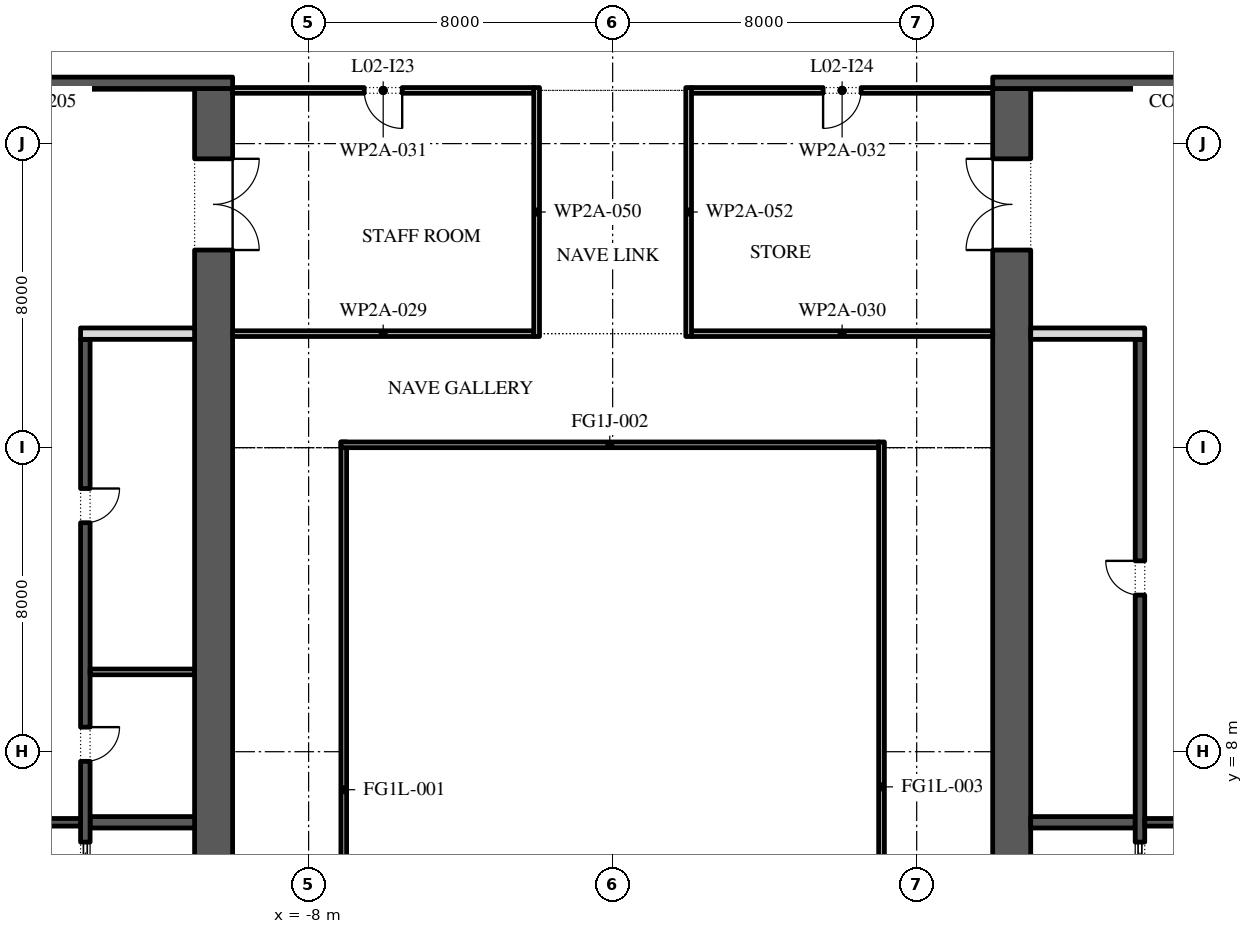
"""IFC4 building model, lengths in metres.
Left out: names, types, materials, properties, quantities, classifications, styles, units other than length and angle.
Written with IfcOpenShell. Run it as: python <this file> out.ifc"""

import sys

from ifc_helpers import new_model, si_unit, direction, frame, frame_2d, origin, place, context, subcontext, project, spatial, rectangle, extrude, element, fill, save


model = new_model("IFC4")
c1 = context("Model", 3, precision=1e-05, world=origin(), true_north=direction((0.0, 1.0)))
c2 = subcontext(c1, "Body", "Model", "MODEL_VIEW")
j1 = project(units=[si_unit("LENGTHUNIT", "METRE"), si_unit("PLANEANGLEUNIT", "RADIAN")], contexts=[c1])
p1 = place(None, origin())
s1 = spatial("IfcSite", under=j1, at=p1, CompositionType="ELEMENT")
p2 = place(p1, origin())
s2 = spatial("IfcBuilding", under=s1, at=p2, CompositionType="ELEMENT")
p3 = place(p2, frame((0.0, 0.0, 14.0)))
s3 = spatial("IfcBuildingStorey", under=s2, at=p3, CompositionType="ELEMENT", Elevation=14.0)
p4 = place(p3, frame((-7.075, -2.15, 0.0), z_axis=(0.0, 0.0, 1.0), x_axis=(0.0, 1.0, 0.0)))
e1 = element("IfcWall", 1, at=p4, inside=s3, PredefinedType="STANDARD", context=c2, shape_type="SweptSolid", body=[
    extrude(rectangle(XDim=18.3, YDim=0.15, at=frame_2d((9.15, 0.0))), origin(), (0.0, 0.0, 1.0), 4.9),
])
p5 = place(p3, frame((-7.15, 16.075, 0.0), z_axis=(0.0, 0.0, 1.0), x_axis=(1.0, 0.0, 0.0)))
e2 = element("IfcWall", 2, at=p5, inside=s3, PredefinedType="STANDARD", context=c2, shape_type="SweptSolid", body=[
    extrude(rectangle(XDim=14.15, YDim=0.15, at=frame_2d((7.075, 0.0))), origin(), (0.0, 0.0, 1.0), 3.92),
])
p6 = place(p3, frame((7.075, 16.15, 0.0), z_axis=(0.0, 0.0, 1.0), x_axis=(0.0, -1.0, 0.0)))
e3 = element("IfcWall", 3, at=p6, inside=s3, PredefinedType="STANDARD", context=c2, shape_type="SweptSolid", body=[
    extrude(rectangle(XDim=18.15, YDim=0.15, at=frame_2d((9.075, 0.0))), origin(), (0.0, 0.0, 1.0), 4.9),
])
p7 = place(p3, frame((-10.5, -2.45, 0.0), z_axis=(0.0, 0.0, 1.0), x_axis=(0.0, 1.0, 0.0)))
e4 = element("IfcWall", 4, at=p7, inside=s3, PredefinedType="SHEAR", context=c2, shape_type="SweptSolid", body=[
    extrude(rectangle(XDim=27.9, YDim=1.0, at=frame_2d((13.95, 0.0))), origin(), (0.0, 0.0, 1.0), 4.9),
])
p8 = place(p7, frame((23.65, 0.0, 0.0)))
e5 = element("IfcOpeningElement", 5, at=p8, cuts=e4, PredefinedType="OPENING", context=c2, shape_type="SweptSolid", body=[
    extrude(rectangle(XDim=2.4, YDim=2.1, at=frame_2d((1.2, 1.05))), frame((0.0, 0.51, 0.0), z_axis=(0.0, -1.0, 0.0), x_axis=(1.0, 0.0, 0.0)), (0.0, 0.0, 1.0), 1.02),
])
p9 = place(p7, frame((2.7, 0.0, 0.0)))
e6 = element("IfcOpeningElement", 6, at=p9, cuts=e4, PredefinedType="OPENING", context=c2, shape_type="SweptSolid", body=[
    extrude(rectangle(XDim=0.9, YDim=2.1, at=frame_2d((0.45, 1.05))), frame((0.0, 0.51, 0.0), z_axis=(0.0, -1.0, 0.0), x_axis=(1.0, 0.0, 0.0)), (0.0, 0.0, 1.0), 1.02),
])
p10 = place(p3, frame((-22.0, 25.6, 0.0), z_axis=(0.0, 0.0, 1.0), x_axis=(1.0, 0.0, 0.0)))
e7 = element("IfcWall", 7, at=p10, inside=s3, PredefinedType="SHEAR", context=c2, shape_type="SweptSolid", body=[
    extrude(rectangle(XDim=12.0, YDim=0.3, at=frame_2d((6.0, 0.0))), origin(), (0.0, 0.0, 1.0), 4.9),
])
p11 = place(p3, frame((-13.75, 6.143, 0.0), z_axis=(0.0, 0.0, 1.0), x_axis=(1.0, 0.0, 0.0)))
e8 = element("IfcWall", 8, at=p11, inside=s3, PredefinedType="SHEAR", context=c2, shape_type="SweptSolid", body=[
    extrude(rectangle(XDim=2.75, YDim=0.3, at=frame_2d((1.375, 0.0))), origin(), (0.0, 0.0, 1.0), 4.9),
])
p12 = place(p3, frame((-13.875, -2.45, 0.0), z_axis=(0.0, 0.0, 1.0), x_axis=(0.0, 1.0, 0.0)))
e9 = element("IfcWall", 9, at=p12, inside=s3, PredefinedType="SHEAR", context=c2, shape_type="SweptSolid", body=[
    extrude(rectangle(XDim=21.3, YDim=0.25, at=frame_2d((10.65, 0.0))), origin(), (0.0, 0.0, 1.0), 4.9),
])
p13 = place(p12, frame((10.196, 0.0, 0.0)))
e10 = element("IfcOpeningElement", 10, at=p13, cuts=e9, PredefinedType="OPENING", context=c2, shape_type="SweptSolid", body=[
    extrude(rectangle(XDim=0.9, YDim=2.1, at=frame_2d((0.45, 1.05))), frame((0.0, 0.135, 0.0), z_axis=(0.0, -1.0, 0.0), x_axis=(1.0, 0.0, 0.0)), (0.0, 0.0, 1.0), 0.27),
])
p14 = place(p12, frame((16.475, 0.0, 0.0)))
e11 = element("IfcOpeningElement", 11, at=p14, cuts=e9, PredefinedType="OPENING", context=c2, shape_type="SweptSolid", body=[
    extrude(rectangle(XDim=0.9, YDim=2.1, at=frame_2d((0.45, 1.05))), frame((0.0, 0.135, 0.0), z_axis=(0.0, -1.0, 0.0), x_axis=(1.0, 0.0, 0.0)), (0.0, 0.0, 1.0), 0.27),
])
p15 = place(p12, frame((6.971, 0.0, 0.0)))
e12 = element("IfcOpeningElement", 12, at=p15, cuts=e9, PredefinedType="OPENING", context=c2, shape_type="SweptSolid", body=[
    extrude(rectangle(XDim=1.1, YDim=2.1, at=frame_2d((0.55, 1.05))), frame((0.0, 0.135, 0.0), z_axis=(0.0, -1.0, 0.0), x_axis=(1.0, 0.0, 0.0)), (0.0, 0.0, 1.0), 0.27),
])
p16 = place(p3, frame((-14.0, 19.0, 0.0), z_axis=(0.0, 0.0, 1.0), x_axis=(1.0, 0.0, 0.0)))
e13 = element("IfcWall", 13, at=p16, inside=s3, PredefinedType="PARTITIONING", context=c2, shape_type="SweptSolid", body=[
    extrude(rectangle(XDim=3.0, YDim=0.3, at=frame_2d((1.5, 0.0))), origin(), (0.0, 0.0, 1.0), 4.9),
])
p17 = place(p3, frame((-13.75, 10.1, 0.0), z_axis=(0.0, 0.0, 1.0), x_axis=(1.0, 0.0, 0.0)))
e14 = element("IfcWall", 14, at=p17, inside=s3, PredefinedType="PARTITIONING", context=c2, shape_type="SweptSolid", body=[
    extrude(rectangle(XDim=2.75, YDim=0.15, at=frame_2d((1.375, 0.0))), origin(), (0.0, 0.0, 1.0), 4.9),
])
p18 = place(p3, frame((-18.0, 6.143, 0.0), z_axis=(0.0, 0.0, 1.0), x_axis=(1.0, 0.0, 0.0)))
e15 = element("IfcWall", 15, at=p18, inside=s3, PredefinedType="SHEAR", context=c2, shape_type="SweptSolid", body=[
    extrude(rectangle(XDim=4.0, YDim=0.2, at=frame_2d((2.0, 0.0))), origin(), (0.0, 0.0, 1.0), 4.9),
])
p19 = place(p18, frame((1.4, 0.0, 0.0)))
e16 = element("IfcOpeningElement", 16, at=p19, cuts=e15, PredefinedType="OPENING", context=c2, shape_type="SweptSolid", body=[
    extrude(rectangle(XDim=1.2, YDim=2.1, at=frame_2d((0.6, 1.05))), frame((0.0, 0.11, 0.0), z_axis=(0.0, -1.0, 0.0), x_axis=(1.0, 0.0, 0.0)), (0.0, 0.0, 1.0), 0.22),
])
p20 = place(p3, frame((10.5, -2.45, 0.0), z_axis=(0.0, 0.0, 1.0), x_axis=(0.0, 1.0, 0.0)))
e17 = element("IfcWall", 17, at=p20, inside=s3, PredefinedType="SHEAR", context=c2, shape_type="SweptSolid", body=[
    extrude(rectangle(XDim=27.9, YDim=1.0, at=frame_2d((13.95, 0.0))), origin(), (0.0, 0.0, 1.0), 4.9),
])
p21 = place(p20, frame((23.65, 0.0, 0.0)))
e18 = element("IfcOpeningElement", 18, at=p21, cuts=e17, PredefinedType="OPENING", context=c2, shape_type="SweptSolid", body=[
    extrude(rectangle(XDim=2.4, YDim=2.1, at=frame_2d((1.2, 1.05))), frame((0.0, 0.51, 0.0), z_axis=(0.0, -1.0, 0.0), x_axis=(1.0, 0.0, 0.0)), (0.0, 0.0, 1.0), 1.02),
])
p22 = place(p20, frame((1.087, 0.0, 0.0)))
e19 = element("IfcOpeningElement", 19, at=p22, cuts=e17, PredefinedType="OPENING", context=c2, shape_type="SweptSolid", body=[
    extrude(rectangle(XDim=0.9, YDim=2.1, at=frame_2d((0.45, 1.05))), frame((0.0, 0.51, 0.0), z_axis=(0.0, -1.0, 0.0), x_axis=(1.0, 0.0, 0.0)), (0.0, 0.0, 1.0), 1.02),
])
p23 = place(p20, frame((4.312, 0.0, 0.0)))
e20 = element("IfcOpeningElement", 20, at=p23, cuts=e17, PredefinedType="OPENING", context=c2, shape_type="SweptSolid", body=[
    extrude(rectangle(XDim=0.9, YDim=2.1, at=frame_2d((0.45, 1.05))), frame((0.0, 0.51, 0.0), z_axis=(0.0, -1.0, 0.0), x_axis=(1.0, 0.0, 0.0)), (0.0, 0.0, 1.0), 1.02),
])
p24 = place(p3, frame((10.0, 25.6, 0.0), z_axis=(0.0, 0.0, 1.0), x_axis=(1.0, 0.0, 0.0)))
e21 = element("IfcWall", 21, at=p24, inside=s3, PredefinedType="SHEAR", context=c2, shape_type="SweptSolid", body=[
    extrude(rectangle(XDim=12.0, YDim=0.3, at=frame_2d((6.0, 0.0))), origin(), (0.0, 0.0, 1.0), 4.9),
])
p25 = place(p3, frame((11.0, 6.143, 0.0), z_axis=(0.0, 0.0, 1.0), x_axis=(1.0, 0.0, 0.0)))
e22 = element("IfcWall", 22, at=p25, inside=s3, PredefinedType="SHEAR", context=c2, shape_type="SweptSolid", body=[
    extrude(rectangle(XDim=2.75, YDim=0.3, at=frame_2d((1.375, 0.0))), origin(), (0.0, 0.0, 1.0), 4.9),
])
p26 = place(p3, frame((13.875, -2.45, 0.0), z_axis=(0.0, 0.0, 1.0), x_axis=(0.0, 1.0, 0.0)))
e23 = element("IfcWall", 23, at=p26, inside=s3, PredefinedType="SHEAR", context=c2, shape_type="SweptSolid", body=[
    extrude(rectangle(XDim=21.3, YDim=0.25, at=frame_2d((10.65, 0.0))), origin(), (0.0, 0.0, 1.0), 4.9),
])
p27 = place(p26, frame((14.571, 0.0, 0.0)))
e24 = element("IfcOpeningElement", 24, at=p27, cuts=e23, PredefinedType="OPENING", context=c2, shape_type="SweptSolid", body=[
    extrude(rectangle(XDim=0.9, YDim=2.1, at=frame_2d((0.45, 1.05))), frame((0.0, 0.135, 0.0), z_axis=(0.0, -1.0, 0.0), x_axis=(1.0, 0.0, 0.0)), (0.0, 0.0, 1.0), 0.27),
])
p28 = place(p26, frame((6.971, 0.0, 0.0)))
e25 = element("IfcOpeningElement", 25, at=p28, cuts=e23, PredefinedType="OPENING", context=c2, shape_type="SweptSolid", body=[
    extrude(rectangle(XDim=1.1, YDim=2.1, at=frame_2d((0.55, 1.05))), frame((0.0, 0.135, 0.0), z_axis=(0.0, -1.0, 0.0), x_axis=(1.0, 0.0, 0.0)), (0.0, 0.0, 1.0), 0.27),
])
p29 = place(p3, frame((11.0, 19.0, 0.0), z_axis=(0.0, 0.0, 1.0), x_axis=(1.0, 0.0, 0.0)))
e26 = element("IfcWall", 26, at=p29, inside=s3, PredefinedType="PARTITIONING", context=c2, shape_type="SweptSolid", body=[
    extrude(rectangle(XDim=3.0, YDim=0.3, at=frame_2d((1.5, 0.0))), origin(), (0.0, 0.0, 1.0), 4.9),
])
p30 = place(p3, frame((14.0, 6.143, 0.0), z_axis=(0.0, 0.0, 1.0), x_axis=(1.0, 0.0, 0.0)))
e27 = element("IfcWall", 27, at=p30, inside=s3, PredefinedType="SHEAR", context=c2, shape_type="SweptSolid", body=[
    extrude(rectangle(XDim=4.0, YDim=0.2, at=frame_2d((2.0, 0.0))), origin(), (0.0, 0.0, 1.0), 4.9),
])
p31 = place(p30, frame((1.4, 0.0, 0.0)))
e28 = element("IfcOpeningElement", 28, at=p31, cuts=e27, PredefinedType="OPENING", context=c2, shape_type="SweptSolid", body=[
    extrude(rectangle(XDim=1.2, YDim=2.1, at=frame_2d((0.6, 1.05))), frame((0.0, 0.11, 0.0), z_axis=(0.0, -1.0, 0.0), x_axis=(1.0, 0.0, 0.0)), (0.0, 0.0, 1.0), 0.22),
])
for number, where, z_axis, x_axis in (
    (29, (-10.0, 19.0, 0.0), (0.0, 0.0, 1.0), (1.0, 0.0, 0.0)),
    (30, (2.075, 19.0, 0.0), (0.0, 0.0, 1.0), (1.0, 0.0, 0.0)),
):
    element("IfcWall", number, at=place(p3, frame(where, z_axis=z_axis, x_axis=x_axis)), inside=s3, PredefinedType="PARTITIONING", context=c2, shape_type="SweptSolid", body=[
        extrude(rectangle(XDim=7.925, YDim=0.15, at=frame_2d((3.962, 0.0))), origin(), (0.0, 0.0, 1.0), 4.9),
    ])
p32 = place(p3, frame((-10.0, 25.4, 0.0), z_axis=(0.0, 0.0, 1.0), x_axis=(1.0, 0.0, 0.0)))
e31 = element("IfcWall", 31, at=p32, inside=s3, PredefinedType="PARTITIONING", context=c2, shape_type="SweptSolid", body=[
    extrude(rectangle(XDim=7.925, YDim=0.15, at=frame_2d((3.962, 0.0))), origin(), (0.0, 0.0, 1.0), 4.9),
])
p33 = place(p32, frame((3.462, 0.0, 0.0)))
e32 = element("IfcOpeningElement", 32, at=p33, cuts=e31, PredefinedType="OPENING", context=c2, shape_type="SweptSolid", body=[
    extrude(rectangle(XDim=1.0, YDim=2.1, at=frame_2d((0.5, 1.05))), frame((0.0, 0.085, 0.0), z_axis=(0.0, -1.0, 0.0), x_axis=(1.0, 0.0, 0.0)), (0.0, 0.0, 1.0), 0.17),
])
p34 = place(p3, frame((2.075, 25.4, 0.0), z_axis=(0.0, 0.0, 1.0), x_axis=(1.0, 0.0, 0.0)))
e33 = element("IfcWall", 33, at=p34, inside=s3, PredefinedType="PARTITIONING", context=c2, shape_type="SweptSolid", body=[
    extrude(rectangle(XDim=7.925, YDim=0.15, at=frame_2d((3.962, 0.0))), origin(), (0.0, 0.0, 1.0), 4.9),
])
p35 = place(p34, frame((3.462, 0.0, 0.0)))
e34 = element("IfcOpeningElement", 34, at=p35, cuts=e33, PredefinedType="OPENING", context=c2, shape_type="SweptSolid", body=[
    extrude(rectangle(XDim=1.0, YDim=2.1, at=frame_2d((0.5, 1.05))), frame((0.0, 0.085, 0.0), z_axis=(0.0, -1.0, 0.0), x_axis=(1.0, 0.0, 0.0)), (0.0, 0.0, 1.0), 0.17),
])
for number, where, z_axis, x_axis in (
    (35, (-2.0, 18.925, 0.0), (0.0, 0.0, 1.0), (0.0, 1.0, 0.0)),
    (36, (2.0, 18.925, 0.0), (0.0, 0.0, 1.0), (0.0, 1.0, 0.0)),
):
    element("IfcWall", number, at=place(p3, frame(where, z_axis=z_axis, x_axis=x_axis)), inside=s3, PredefinedType="PARTITIONING", context=c2, shape_type="SweptSolid", body=[
        extrude(rectangle(XDim=6.55, YDim=0.15, at=frame_2d((3.275, 0.0))), origin(), (0.0, 0.0, 1.0), 4.9),
    ])
p36 = place(p13, frame((0.9, -0.2, 0.0), z_axis=(0.0, 0.0, 1.0), x_axis=(-1.0, 0.0, 0.0)))
e37 = element("IfcDoor", 37, at=p36, inside=s3, OperationType="SINGLE_SWING_RIGHT", PredefinedType="DOOR", context=c2, shape_type="SweptSolid", body=[
    extrude(rectangle(XDim=0.9, YDim=2.1, at=frame_2d((0.45, 1.05))), frame((0.0, -0.075, 0.0), z_axis=(0.0, -1.0, 0.0), x_axis=(1.0, 0.0, 0.0)), (0.0, 0.0, 1.0), 0.05),
])
fill(e10, e37)
p37 = place(p14, frame((0.9, -0.2, 0.0), z_axis=(0.0, 0.0, 1.0), x_axis=(-1.0, 0.0, 0.0)))
e38 = element("IfcDoor", 38, at=p37, inside=s3, OperationType="SINGLE_SWING_RIGHT", PredefinedType="DOOR", context=c2, shape_type="SweptSolid", body=[
    extrude(rectangle(XDim=0.9, YDim=2.1, at=frame_2d((0.45, 1.05))), frame((0.0, -0.075, 0.0), z_axis=(0.0, -1.0, 0.0), x_axis=(1.0, 0.0, 0.0)), (0.0, 0.0, 1.0), 0.05),
])
fill(e11, e38)
p38 = place(p15, origin())
e39 = element("IfcDoor", 39, at=p38, inside=s3, OperationType="SLIDING_TO_LEFT", PredefinedType="DOOR", context=c2, shape_type="SweptSolid", body=[
    extrude(rectangle(XDim=1.1, YDim=2.1, at=frame_2d((0.55, 1.05))), frame((0.0, 0.025, 0.0), z_axis=(0.0, -1.0, 0.0), x_axis=(1.0, 0.0, 0.0)), (0.0, 0.0, 1.0), 0.05),
])
fill(e12, e39)
p39 = place(p8, frame((2.4, 0.0, 0.0), z_axis=(0.0, 0.0, 1.0), x_axis=(-1.0, 0.0, 0.0)))
e40 = element("IfcDoor", 40, at=p39, inside=s3, OperationType="DOUBLE_DOOR_SINGLE_SWING", PredefinedType="DOOR", context=c2, shape_type="SweptSolid", body=[
    extrude(rectangle(XDim=2.4, YDim=2.1, at=frame_2d((1.2, 1.05))), frame((0.0, 0.025, 0.0), z_axis=(0.0, -1.0, 0.0), x_axis=(1.0, 0.0, 0.0)), (0.0, 0.0, 1.0), 0.05),
])
fill(e5, e40)
p40 = place(p27, origin())
e41 = element("IfcDoor", 41, at=p40, inside=s3, OperationType="SINGLE_SWING_LEFT", PredefinedType="DOOR", context=c2, shape_type="SweptSolid", body=[
    extrude(rectangle(XDim=0.9, YDim=2.1, at=frame_2d((0.45, 1.05))), frame((0.0, 0.125, 0.0), z_axis=(0.0, -1.0, 0.0), x_axis=(1.0, 0.0, 0.0)), (0.0, 0.0, 1.0), 0.05),
])
fill(e24, e41)
p41 = place(p28, origin())
e42 = element("IfcDoor", 42, at=p41, inside=s3, OperationType="SLIDING_TO_LEFT", PredefinedType="DOOR", context=c2, shape_type="SweptSolid", body=[
    extrude(rectangle(XDim=1.1, YDim=2.1, at=frame_2d((0.55, 1.05))), frame((0.0, 0.025, 0.0), z_axis=(0.0, -1.0, 0.0), x_axis=(1.0, 0.0, 0.0)), (0.0, 0.0, 1.0), 0.05),
])
fill(e25, e42)
p42 = place(p21, origin())
e43 = element("IfcDoor", 43, at=p42, inside=s3, OperationType="DOUBLE_DOOR_SINGLE_SWING", PredefinedType="DOOR", context=c2, shape_type="SweptSolid", body=[
    extrude(rectangle(XDim=2.4, YDim=2.1, at=frame_2d((1.2, 1.05))), frame((0.0, 0.025, 0.0), z_axis=(0.0, -1.0, 0.0), x_axis=(1.0, 0.0, 0.0)), (0.0, 0.0, 1.0), 0.05),
])
fill(e18, e43)
p43 = place(p33, frame((1.0, 0.0, 0.0), z_axis=(0.0, 0.0, 1.0), x_axis=(-1.0, 0.0, 0.0)))
e44 = element("IfcDoor", 44, at=p43, inside=s3, OperationType="SINGLE_SWING_RIGHT", PredefinedType="DOOR", context=c2, shape_type="SweptSolid", body=[
    extrude(rectangle(XDim=1.0, YDim=2.1, at=frame_2d((0.5, 1.05))), frame((0.0, 0.025, 0.0), z_axis=(0.0, -1.0, 0.0), x_axis=(1.0, 0.0, 0.0)), (0.0, 0.0, 1.0), 0.05),
])
fill(e32, e44)
p44 = place(p35, frame((1.0, 0.0, 0.0), z_axis=(0.0, 0.0, 1.0), x_axis=(-1.0, 0.0, 0.0)))
e45 = element("IfcDoor", 45, at=p44, inside=s3, OperationType="SINGLE_SWING_LEFT", PredefinedType="DOOR", context=c2, shape_type="SweptSolid", body=[
    extrude(rectangle(XDim=1.0, YDim=2.1, at=frame_2d((0.5, 1.05))), frame((0.0, 0.025, 0.0), z_axis=(0.0, -1.0, 0.0), x_axis=(1.0, 0.0, 0.0)), (0.0, 0.0, 1.0), 0.05),
])
fill(e34, e45)
save(model, sys.argv[1])
